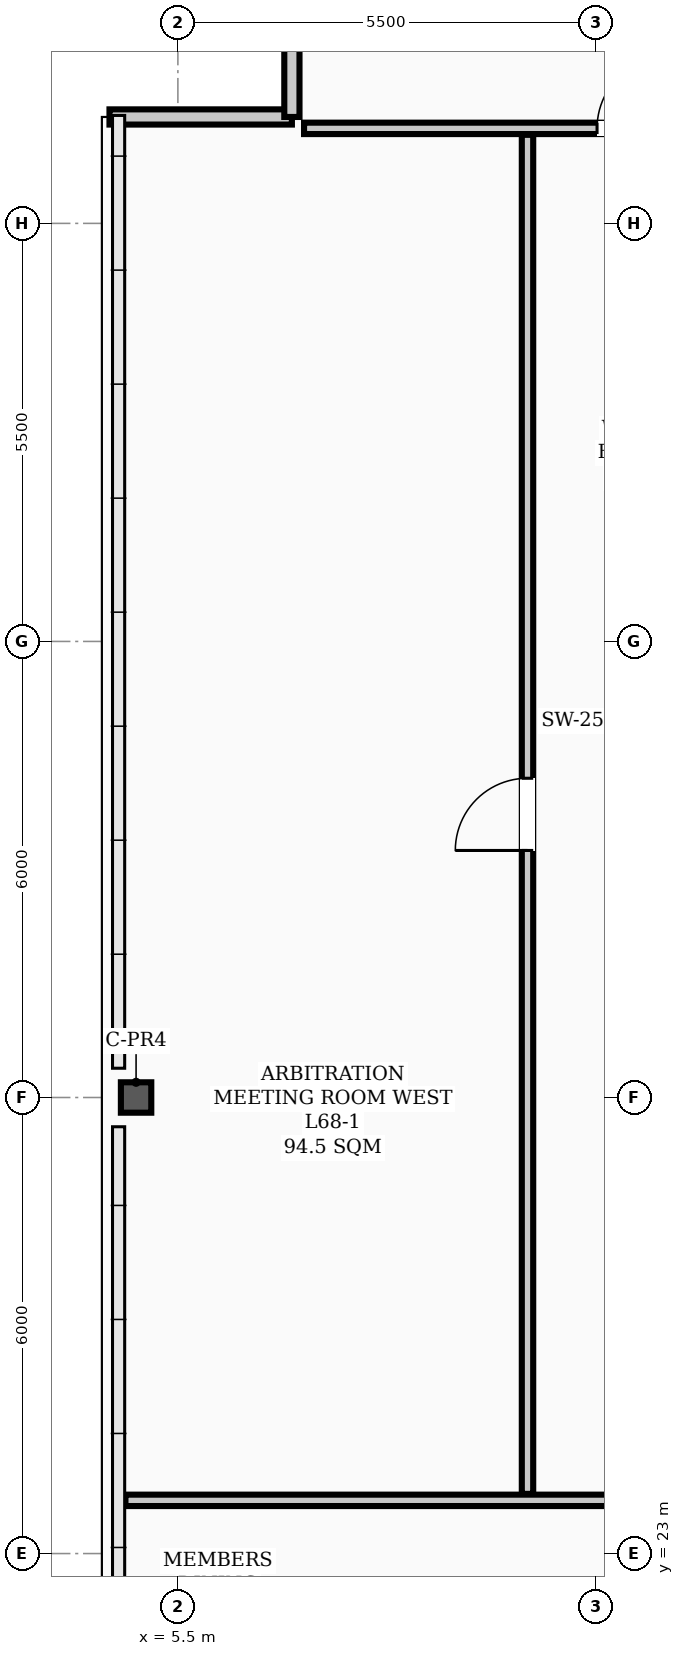
"""IFC4 building model, lengths in metres.
Left out: names, types, materials, properties, quantities, classifications, styles, units other than length and angle.
Written with IfcOpenShell. Run it as: python <this file> out.ifc"""

import sys

from ifc_helpers import new_model, si_unit, direction, frame, frame_2d, origin, origin_2d, place, context, subcontext, project, spatial, rectangle, hollow_rectangle, extrude, element, fill, save


model = new_model("IFC4")
c1 = context("Model", 3, precision=1e-05, world=origin(), true_north=direction((0.0, 1.0)))
c2 = subcontext(c1, "Body", "Model", "MODEL_VIEW")
j1 = project(units=[si_unit("LENGTHUNIT", "METRE"), si_unit("PLANEANGLEUNIT", "RADIAN")], contexts=[c1])
p1 = place(None, origin())
s1 = spatial("IfcSite", under=j1, at=p1, CompositionType="ELEMENT")
p2 = place(p1, origin())
s2 = spatial("IfcBuilding", under=s1, at=p2, CompositionType="ELEMENT")
p3 = place(p2, frame((0.0, 0.0, 273.5)))
s3 = spatial("IfcBuildingStorey", under=s2, at=p3, CompositionType="ELEMENT", Elevation=273.5)
p4 = place(p3, frame((4.95, 29.0, 0.0), z_axis=(0.0, 0.0, 1.0), x_axis=(1.0, 0.0, 0.0)))
e1 = element("IfcColumn", 1, at=p4, inside=s3, PredefinedType="COLUMN", context=c2, shape_type="SweptSolid", body=[
    extrude(hollow_rectangle(XDim=0.4, YDim=0.4, WallThickness=0.02, InnerFilletRadius=0.02, OuterFilletRadius=0.04, at=origin_2d()), origin(), (0.0, 0.0, 1.0), 3.9),
])
p5 = place(p3, frame((4.6, 41.9, 0.0), z_axis=(0.0, 0.0, 1.0), x_axis=(1.0, 0.0, 0.0)))
e2 = element("IfcWall", 2, at=p5, inside=s3, PredefinedType="PARAPET", context=c2, shape_type="SweptSolid", body=[
    extrude(rectangle(XDim=2.4, YDim=0.2, at=frame_2d((1.2, 0.0))), origin(), (0.0, 0.0, 1.0), 1.2),
])
p6 = place(p3, frame((7.0, 41.9, 0.0), z_axis=(0.0, 0.0, 1.0), x_axis=(0.0, 1.0, 0.0)))
e3 = element("IfcWall", 3, at=p6, inside=s3, PredefinedType="PARAPET", context=c2, shape_type="SweptSolid", body=[
    extrude(rectangle(XDim=2.4, YDim=0.2, at=frame_2d((1.2, 0.0))), origin(), (0.0, 0.0, 1.0), 1.2),
])
p7 = place(p3, frame((4.81, 23.7, 0.0), z_axis=(0.0, 0.0, 1.0), x_axis=(1.0, 0.0, 0.0)))
e4 = element("IfcWall", 4, at=p7, inside=s3, PredefinedType="PARTITIONING", context=c2, shape_type="SweptSolid", body=[
    extrude(rectangle(XDim=40.88, YDim=0.15, at=frame_2d((20.44, 0.0))), origin(), (0.0, 0.0, 1.0), 3.2),
])
p8 = place(p7, frame((10.415, 0.0, 0.0)))
e5 = element("IfcOpeningElement", 5, at=p8, cuts=e4, PredefinedType="OPENING", context=c2, shape_type="SweptSolid", body=[
    extrude(rectangle(XDim=0.95, YDim=2.08, at=frame_2d((0.475, 1.04))), frame((0.0, 0.085, 0.0), z_axis=(0.0, -1.0, 0.0), x_axis=(1.0, 0.0, 0.0)), (0.0, 0.0, 1.0), 0.17),
])
p9 = place(p7, frame((16.015, 0.0, 0.0)))
e6 = element("IfcOpeningElement", 6, at=p9, cuts=e4, PredefinedType="OPENING", context=c2, shape_type="SweptSolid", body=[
    extrude(rectangle(XDim=0.95, YDim=2.08, at=frame_2d((0.475, 1.04))), frame((0.0, 0.085, 0.0), z_axis=(0.0, -1.0, 0.0), x_axis=(1.0, 0.0, 0.0)), (0.0, 0.0, 1.0), 0.17),
])
p10 = place(p7, frame((22.715, 0.0, 0.0)))
e7 = element("IfcOpeningElement", 7, at=p10, cuts=e4, PredefinedType="OPENING", context=c2, shape_type="SweptSolid", body=[
    extrude(rectangle(XDim=0.95, YDim=2.08, at=frame_2d((0.475, 1.04))), frame((0.0, 0.085, 0.0), z_axis=(0.0, -1.0, 0.0), x_axis=(1.0, 0.0, 0.0)), (0.0, 0.0, 1.0), 0.17),
])
p11 = place(p7, frame((29.415, 0.0, 0.0)))
e8 = element("IfcOpeningElement", 8, at=p11, cuts=e4, PredefinedType="OPENING", context=c2, shape_type="SweptSolid", body=[
    extrude(rectangle(XDim=0.95, YDim=2.08, at=frame_2d((0.475, 1.04))), frame((0.0, 0.085, 0.0), z_axis=(0.0, -1.0, 0.0), x_axis=(1.0, 0.0, 0.0)), (0.0, 0.0, 1.0), 0.17),
])
p12 = place(p7, frame((36.56, 0.0, 0.0)))
e9 = element("IfcOpeningElement", 9, at=p12, cuts=e4, PredefinedType="OPENING", context=c2, shape_type="SweptSolid", body=[
    extrude(rectangle(XDim=0.95, YDim=2.08, at=frame_2d((0.475, 1.04))), frame((0.0, 0.085, 0.0), z_axis=(0.0, -1.0, 0.0), x_axis=(1.0, 0.0, 0.0)), (0.0, 0.0, 1.0), 0.17),
])
p13 = place(p3, frame((7.16, 41.75, 0.0), z_axis=(0.0, 0.0, 1.0), x_axis=(1.0, 0.0, 0.0)))
e10 = element("IfcWall", 10, at=p13, inside=s3, PredefinedType="PARTITIONING", context=c2, shape_type="SweptSolid", body=[
    extrude(rectangle(XDim=36.18, YDim=0.15, at=frame_2d((18.09, 0.0))), origin(), (0.0, 0.0, 1.0), 3.2),
])
p14 = place(p13, frame((3.855, 0.0, 0.0)))
e11 = element("IfcOpeningElement", 11, at=p14, cuts=e10, PredefinedType="OPENING", context=c2, shape_type="SweptSolid", body=[
    extrude(rectangle(XDim=0.95, YDim=2.08, at=frame_2d((0.475, 1.04))), frame((0.0, 0.085, 0.0), z_axis=(0.0, -1.0, 0.0), x_axis=(1.0, 0.0, 0.0)), (0.0, 0.0, 1.0), 0.17),
])
p15 = place(p13, frame((13.165, 0.0, 0.0)))
e12 = element("IfcOpeningElement", 12, at=p15, cuts=e10, PredefinedType="OPENING", context=c2, shape_type="SweptSolid", body=[
    extrude(rectangle(XDim=0.95, YDim=2.08, at=frame_2d((0.475, 1.04))), frame((0.0, 0.085, 0.0), z_axis=(0.0, -1.0, 0.0), x_axis=(1.0, 0.0, 0.0)), (0.0, 0.0, 1.0), 0.17),
])
p16 = place(p13, frame((20.765, 0.0, 0.0)))
e13 = element("IfcOpeningElement", 13, at=p16, cuts=e10, PredefinedType="OPENING", context=c2, shape_type="SweptSolid", body=[
    extrude(rectangle(XDim=0.95, YDim=2.08, at=frame_2d((0.475, 1.04))), frame((0.0, 0.085, 0.0), z_axis=(0.0, -1.0, 0.0), x_axis=(1.0, 0.0, 0.0)), (0.0, 0.0, 1.0), 0.17),
])
p17 = place(p13, frame((28.365, 0.0, 0.0)))
e14 = element("IfcOpeningElement", 14, at=p17, cuts=e10, PredefinedType="OPENING", context=c2, shape_type="SweptSolid", body=[
    extrude(rectangle(XDim=0.95, YDim=2.08, at=frame_2d((0.475, 1.04))), frame((0.0, 0.085, 0.0), z_axis=(0.0, -1.0, 0.0), x_axis=(1.0, 0.0, 0.0)), (0.0, 0.0, 1.0), 0.17),
])
p18 = place(p13, frame((34.265, 0.0, 0.0)))
e15 = element("IfcOpeningElement", 15, at=p18, cuts=e10, PredefinedType="OPENING", context=c2, shape_type="SweptSolid", body=[
    extrude(rectangle(XDim=0.95, YDim=2.08, at=frame_2d((0.475, 1.04))), frame((0.0, 0.085, 0.0), z_axis=(0.0, -1.0, 0.0), x_axis=(1.0, 0.0, 0.0)), (0.0, 0.0, 1.0), 0.17),
])
p19 = place(p3, frame((10.1, 23.785, 0.0), z_axis=(0.0, 0.0, 1.0), x_axis=(0.0, 1.0, 0.0)))
e16 = element("IfcWall", 16, at=p19, inside=s3, PredefinedType="PARTITIONING", context=c2, shape_type="SweptSolid", body=[
    extrude(rectangle(XDim=17.88, YDim=0.15, at=frame_2d((8.94, 0.0))), origin(), (0.0, 0.0, 1.0), 3.1),
])
p20 = place(p19, frame((8.465, 0.0, 0.0)))
e17 = element("IfcOpeningElement", 17, at=p20, cuts=e16, PredefinedType="OPENING", context=c2, shape_type="SweptSolid", body=[
    extrude(rectangle(XDim=0.95, YDim=2.08, at=frame_2d((0.475, 1.04))), frame((0.0, 0.085, 0.0), z_axis=(0.0, -1.0, 0.0), x_axis=(1.0, 0.0, 0.0)), (0.0, 0.0, 1.0), 0.17),
])
p21 = place(p20, origin())
e18 = element("IfcDoor", 18, at=p21, inside=s3, OperationType="SINGLE_SWING_LEFT", PredefinedType="DOOR", context=c2, shape_type="SweptSolid", body=[
    extrude(rectangle(XDim=0.95, YDim=2.08, at=frame_2d((0.475, 1.04))), frame((0.0, 0.025, 0.0), z_axis=(0.0, -1.0, 0.0), x_axis=(1.0, 0.0, 0.0)), (0.0, 0.0, 1.0), 0.05),
])
fill(e17, e18)
p22 = place(p14, origin())
e19 = element("IfcDoor", 19, at=p22, inside=s3, OperationType="SINGLE_SWING_RIGHT", PredefinedType="DOOR", context=c2, shape_type="SweptSolid", body=[
    extrude(rectangle(XDim=0.95, YDim=2.08, at=frame_2d((0.475, 1.04))), frame((0.0, 0.025, 0.0), z_axis=(0.0, -1.0, 0.0), x_axis=(1.0, 0.0, 0.0)), (0.0, 0.0, 1.0), 0.05),
])
fill(e11, e19)
save(model, sys.argv[1])
